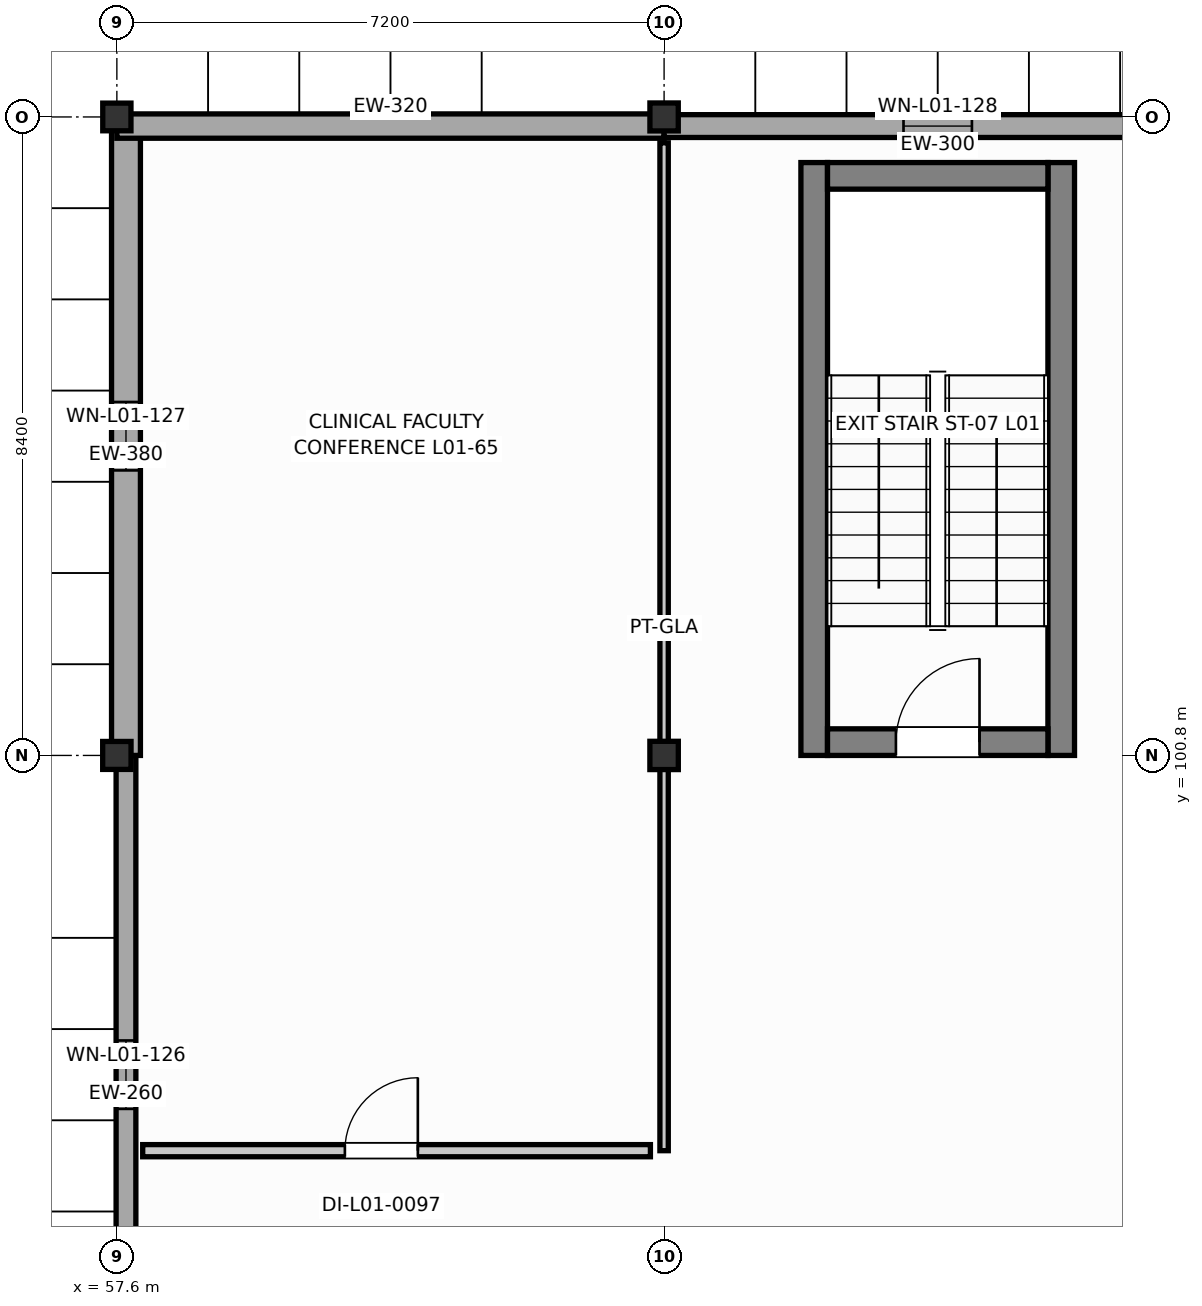
"""IFC4 building model, lengths in metres.
Left out: names, types, materials, properties, quantities, classifications, styles, units other than length and angle.
Written with IfcOpenShell. Run it as: python <this file> out.ifc"""

import sys

from ifc_helpers import new_model, si_unit, direction, frame, frame_2d, origin, origin_2d, place, context, subcontext, project, spatial, rectangle, i_section, extrude, element, fill, save


model = new_model("IFC4")
c1 = context("Model", 3, precision=1e-05, world=origin(), true_north=direction((0.0, 1.0)))
c2 = subcontext(c1, "Body", "Model", "MODEL_VIEW")
j1 = project(units=[si_unit("LENGTHUNIT", "METRE"), si_unit("PLANEANGLEUNIT", "RADIAN")], contexts=[c1])
p1 = place(None, origin())
s1 = spatial("IfcSite", under=j1, at=p1, CompositionType="ELEMENT")
p2 = place(p1, origin())
s2 = spatial("IfcBuilding", under=s1, at=p2, CompositionType="ELEMENT")
p3 = place(p2, frame((0.0, 0.0, 4.8)))
s3 = spatial("IfcBuildingStorey", under=s2, at=p3, CompositionType="ELEMENT", Elevation=4.8)
p4 = place(p3, frame((57.6, 100.8, 0.0), z_axis=(0.0, 0.0, 1.0), x_axis=(1.0, 0.0, 0.0)))
e1 = element("IfcColumn", 1, at=p4, inside=s3, PredefinedType="COLUMN", context=c2, shape_type="SweptSolid", body=[
    extrude(i_section(OverallWidth=0.373, OverallDepth=0.368, WebThickness=0.015, FlangeThickness=0.024, FilletRadius=0.02, at=origin_2d()), origin(), (0.0, 0.0, 1.0), 4.2),
])
p5 = place(p3, frame((57.6, 109.2, 0.0), z_axis=(0.0, 0.0, 1.0), x_axis=(1.0, 0.0, 0.0)))
e2 = element("IfcColumn", 2, at=p5, inside=s3, PredefinedType="COLUMN", context=c2, shape_type="SweptSolid", body=[
    extrude(i_section(OverallWidth=0.371, OverallDepth=0.364, WebThickness=0.013, FlangeThickness=0.022, FilletRadius=0.02, at=origin_2d()), origin(), (0.0, 0.0, 1.0), 4.2),
])
p6 = place(p3, frame((64.8, 100.8, 0.0), z_axis=(0.0, 0.0, 1.0), x_axis=(1.0, 0.0, 0.0)))
e3 = element("IfcColumn", 3, at=p6, inside=s3, PredefinedType="COLUMN", context=c2, shape_type="SweptSolid", body=[
    extrude(i_section(OverallWidth=0.374, OverallDepth=0.372, WebThickness=0.016, FlangeThickness=0.026, FilletRadius=0.02, at=origin_2d()), origin(), (0.0, 0.0, 1.0), 4.2),
])
p7 = place(p3, frame((64.8, 109.2, 0.0), z_axis=(0.0, 0.0, 1.0), x_axis=(1.0, 0.0, 0.0)))
e4 = element("IfcColumn", 4, at=p7, inside=s3, PredefinedType="COLUMN", context=c2, shape_type="SweptSolid", body=[
    extrude(i_section(OverallWidth=0.373, OverallDepth=0.368, WebThickness=0.015, FlangeThickness=0.024, FilletRadius=0.02, at=origin_2d()), origin(), (0.0, 0.0, 1.0), 4.2),
])
for number, where, z_axis, x_axis in (
    (5, (66.775, 100.8, 0.0), (0.0, 0.0, 1.0), (0.0, 1.0, 0.0)),
    (6, (70.025, 100.8, 0.0), (0.0, 0.0, 1.0), (0.0, 1.0, 0.0)),
):
    element("IfcWall", number, at=place(p3, frame(where, z_axis=z_axis, x_axis=x_axis)), inside=s3, PredefinedType="SHEAR", context=c2, shape_type="SweptSolid", body=[
        extrude(rectangle(XDim=7.8, YDim=0.35, at=frame_2d((3.9, 0.0))), origin(), (0.0, 0.0, 1.0), 3.97),
    ])
p8 = place(p3, frame((66.95, 108.425, 0.0), z_axis=(0.0, 0.0, 1.0), x_axis=(1.0, 0.0, 0.0)))
e7 = element("IfcWall", 7, at=p8, inside=s3, PredefinedType="SHEAR", context=c2, shape_type="SweptSolid", body=[
    extrude(rectangle(XDim=2.9, YDim=0.35, at=frame_2d((1.45, 0.0))), origin(), (0.0, 0.0, 1.0), 3.97),
])
p9 = place(p3, frame((66.95, 100.975, 0.0), z_axis=(0.0, 0.0, 1.0), x_axis=(1.0, 0.0, 0.0)))
e8 = element("IfcWall", 8, at=p9, inside=s3, PredefinedType="SHEAR", context=c2, shape_type="SweptSolid", body=[
    extrude(rectangle(XDim=2.9, YDim=0.35, at=frame_2d((1.45, 0.0))), origin(), (0.0, 0.0, 1.0), 3.97),
])
p10 = place(p9, frame((0.9, 0.0, 0.0)))
e9 = element("IfcOpeningElement", 9, at=p10, cuts=e8, PredefinedType="OPENING", context=c2, shape_type="SweptSolid", body=[
    extrude(rectangle(XDim=1.1, YDim=2.15, at=frame_2d((0.55, 1.075))), frame((0.0, 0.185, 0.0), z_axis=(0.0, -1.0, 0.0), x_axis=(1.0, 0.0, 0.0)), (0.0, 0.0, 1.0), 0.37),
])
p11 = place(p3, frame((57.72, 92.4, 0.0), z_axis=(0.0, 0.0, 1.0), x_axis=(0.0, 1.0, 0.0)))
e10 = element("IfcWall", 10, at=p11, inside=s3, PredefinedType="SOLIDWALL", context=c2, shape_type="SweptSolid", body=[
    extrude(rectangle(XDim=8.4, YDim=0.26, at=frame_2d((4.2, 0.0))), origin(), (0.0, 0.0, 1.0), 3.172),
])
p12 = place(p11, frame((3.75, 0.0, 0.95)))
e11 = element("IfcOpeningElement", 11, at=p12, cuts=e10, PredefinedType="OPENING", context=c2, shape_type="SweptSolid", body=[
    extrude(rectangle(XDim=0.9, YDim=1.35, at=frame_2d((0.45, 0.675))), frame((0.0, 0.14, 0.0), z_axis=(0.0, -1.0, 0.0), x_axis=(1.0, 0.0, 0.0)), (0.0, 0.0, 1.0), 0.28),
])
p13 = place(p3, frame((57.72, 100.8, 0.0), z_axis=(0.0, 0.0, 1.0), x_axis=(0.0, 1.0, 0.0)))
e12 = element("IfcWall", 12, at=p13, inside=s3, PredefinedType="SOLIDWALL", context=c2, shape_type="SweptSolid", body=[
    extrude(rectangle(XDim=8.4, YDim=0.38, at=frame_2d((4.2, 0.0))), origin(), (0.0, 0.0, 1.0), 3.172),
])
p14 = place(p13, frame((3.75, 0.0, 0.95)))
e13 = element("IfcOpeningElement", 13, at=p14, cuts=e12, PredefinedType="OPENING", context=c2, shape_type="SweptSolid", body=[
    extrude(rectangle(XDim=0.9, YDim=1.55, at=frame_2d((0.45, 0.775))), frame((0.0, 0.2, 0.0), z_axis=(0.0, -1.0, 0.0), x_axis=(1.0, 0.0, 0.0)), (0.0, 0.0, 1.0), 0.4),
])
p15 = place(p3, frame((57.6, 109.08, 0.0), z_axis=(0.0, 0.0, 1.0), x_axis=(1.0, 0.0, 0.0)))
e14 = element("IfcWall", 14, at=p15, inside=s3, PredefinedType="SOLIDWALL", context=c2, shape_type="SweptSolid", body=[
    extrude(rectangle(XDim=7.2, YDim=0.32, at=frame_2d((3.6, 0.0))), origin(), (0.0, 0.0, 1.0), 3.482),
])
p16 = place(p3, frame((64.8, 109.08, 0.0), z_axis=(0.0, 0.0, 1.0), x_axis=(1.0, 0.0, 0.0)))
e15 = element("IfcWall", 15, at=p16, inside=s3, PredefinedType="SOLIDWALL", context=c2, shape_type="SweptSolid", body=[
    extrude(rectangle(XDim=7.2, YDim=0.3, at=frame_2d((3.6, 0.0))), origin(), (0.0, 0.0, 1.0), 3.482),
])
p17 = place(p16, frame((3.15, 0.0, 0.95)))
e16 = element("IfcOpeningElement", 16, at=p17, cuts=e15, PredefinedType="OPENING", context=c2, shape_type="SweptSolid", body=[
    extrude(rectangle(XDim=0.9, YDim=1.75, at=frame_2d((0.45, 0.875))), frame((0.0, 0.16, 0.0), z_axis=(0.0, -1.0, 0.0), x_axis=(1.0, 0.0, 0.0)), (0.0, 0.0, 1.0), 0.32),
])
p18 = place(p3, frame((64.8, 108.86, 0.0), z_axis=(0.0, 0.0, 1.0), x_axis=(0.0, -1.0, 0.0)))
e17 = element("IfcWall", 17, at=p18, inside=s3, PredefinedType="MOVABLE", context=c2, shape_type="SweptSolid", body=[
    extrude(rectangle(XDim=13.26, YDim=0.11, at=frame_2d((6.63, 0.0))), origin(), (0.0, 0.0, 1.0), 3.408),
])
p19 = place(p3, frame((64.62, 95.6, 0.0), z_axis=(0.0, 0.0, 1.0), x_axis=(-1.0, 0.0, 0.0)))
e18 = element("IfcWall", 18, at=p19, inside=s3, PredefinedType="PARTITIONING", context=c2, shape_type="SweptSolid", body=[
    extrude(rectangle(XDim=6.68, YDim=0.16, at=frame_2d((3.34, 0.0))), origin(), (0.0, 0.0, 1.0), 3.408),
])
p20 = place(p19, frame((3.06, 0.0, 0.0)))
e19 = element("IfcOpeningElement", 19, at=p20, cuts=e18, PredefinedType="OPENING", context=c2, shape_type="SweptSolid", body=[
    extrude(rectangle(XDim=0.96, YDim=2.1, at=frame_2d((0.48, 1.05))), frame((0.0, 0.09, 0.0), z_axis=(0.0, -1.0, 0.0), x_axis=(1.0, 0.0, 0.0)), (0.0, 0.0, 1.0), 0.18),
])
p21 = place(p10, origin())
e20 = element("IfcDoor", 20, at=p21, inside=s3, OperationType="SINGLE_SWING_RIGHT", PredefinedType="DOOR", context=c2, shape_type="SweptSolid", body=[
    extrude(rectangle(XDim=1.1, YDim=2.15, at=frame_2d((0.55, 1.075))), frame((0.0, 0.025, 0.0), z_axis=(0.0, -1.0, 0.0), x_axis=(1.0, 0.0, 0.0)), (0.0, 0.0, 1.0), 0.05),
])
fill(e9, e20)
p22 = place(p12, origin())
e21 = element("IfcWindow", 21, at=p22, inside=s3, PartitioningType="SINGLE_PANEL", PredefinedType="WINDOW", context=c2, shape_type="SweptSolid", body=[
    extrude(rectangle(XDim=0.9, YDim=1.35, at=frame_2d((0.45, 0.675))), frame((0.0, 0.03, 0.0), z_axis=(0.0, -1.0, 0.0), x_axis=(1.0, 0.0, 0.0)), (0.0, 0.0, 1.0), 0.06),
])
fill(e11, e21)
p23 = place(p14, origin())
e22 = element("IfcWindow", 22, at=p23, inside=s3, PartitioningType="SINGLE_PANEL", PredefinedType="WINDOW", context=c2, shape_type="SweptSolid", body=[
    extrude(rectangle(XDim=0.9, YDim=1.55, at=frame_2d((0.45, 0.775))), frame((0.0, 0.03, 0.0), z_axis=(0.0, -1.0, 0.0), x_axis=(1.0, 0.0, 0.0)), (0.0, 0.0, 1.0), 0.06),
])
fill(e13, e22)
p24 = place(p17, origin())
e23 = element("IfcWindow", 23, at=p24, inside=s3, PartitioningType="SINGLE_PANEL", PredefinedType="WINDOW", context=c2, shape_type="SweptSolid", body=[
    extrude(rectangle(XDim=0.9, YDim=1.75, at=frame_2d((0.45, 0.875))), frame((0.0, 0.03, 0.0), z_axis=(0.0, -1.0, 0.0), x_axis=(1.0, 0.0, 0.0)), (0.0, 0.0, 1.0), 0.06),
])
fill(e16, e23)
p25 = place(p20, frame((0.96, 0.0, 0.0), z_axis=(0.0, 0.0, 1.0), x_axis=(-1.0, 0.0, 0.0)))
e24 = element("IfcDoor", 24, at=p25, inside=s3, OperationType="SINGLE_SWING_RIGHT", PredefinedType="DOOR", context=c2, shape_type="SweptSolid", body=[
    extrude(rectangle(XDim=0.96, YDim=2.1, at=frame_2d((0.48, 1.05))), frame((0.0, 0.025, 0.0), z_axis=(0.0, -1.0, 0.0), x_axis=(1.0, 0.0, 0.0)), (0.0, 0.0, 1.0), 0.05),
])
fill(e19, e24)
save(model, sys.argv[1])
